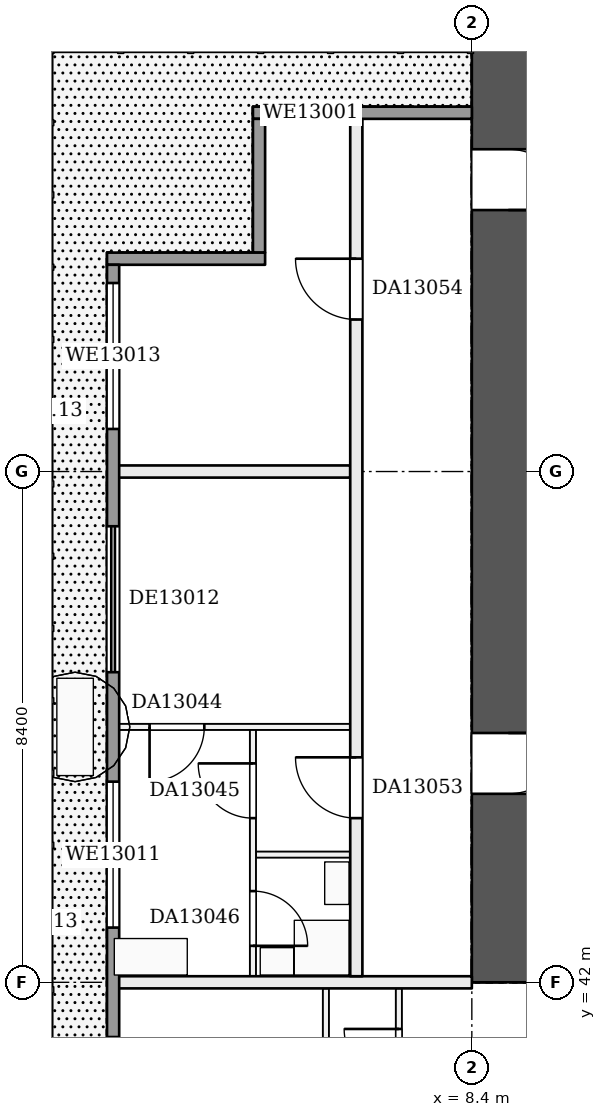
"""IFC4 building model, lengths in metres.
Left out: names, types, materials, properties, quantities, classifications, styles, units other than length and angle.
Written with IfcOpenShell. Run it as: python <this file> out.ifc"""

import sys

from ifc_helpers import new_model, si_unit, direction, frame, frame_2d, origin, place, context, subcontext, project, spatial, rectangle, extrude, element, fill, save


model = new_model("IFC4")
c1 = context("Model", 3, precision=1e-05, world=origin(), true_north=direction((0.0, 1.0)))
c2 = subcontext(c1, "Body", "Model", "MODEL_VIEW")
j1 = project(units=[si_unit("LENGTHUNIT", "METRE"), si_unit("PLANEANGLEUNIT", "RADIAN")], contexts=[c1])
p1 = place(None, origin())
s1 = spatial("IfcSite", under=j1, at=p1, CompositionType="ELEMENT")
p2 = place(p1, origin())
s2 = spatial("IfcBuilding", under=s1, at=p2, CompositionType="ELEMENT")
p3 = place(p2, frame((0.0, 0.0, 56.7)))
s3 = spatial("IfcBuildingStorey", under=s2, at=p3, CompositionType="ELEMENT", Elevation=56.7)
p4 = place(p3, frame((9.0, 58.8, 0.0), z_axis=(0.0, 0.0, 1.0), x_axis=(0.0, -1.0, 0.0)))
e1 = element("IfcWall", 1, at=p4, inside=s3, PredefinedType="SHEAR", context=c2, shape_type="SweptSolid", body=[
    extrude(rectangle(XDim=16.8, YDim=1.2, at=frame_2d((8.4, 0.0))), origin(), (0.0, 0.0, 1.0), 3.22),
])
p5 = place(p4, frame((3.1, 0.0, 0.0)))
e2 = element("IfcOpeningElement", 2, at=p5, cuts=e1, PredefinedType="OPENING", context=c2, shape_type="SweptSolid", body=[
    extrude(rectangle(XDim=1.0, YDim=2.1, at=frame_2d((0.5, 1.05))), frame((0.0, 0.61, 0.0), z_axis=(0.0, -1.0, 0.0), x_axis=(1.0, 0.0, 0.0)), (0.0, 0.0, 1.0), 1.22),
])
p6 = place(p4, frame((12.7, 0.0, 0.0)))
e3 = element("IfcOpeningElement", 3, at=p6, cuts=e1, PredefinedType="OPENING", context=c2, shape_type="SweptSolid", body=[
    extrude(rectangle(XDim=1.0, YDim=2.1, at=frame_2d((0.5, 1.05))), frame((0.0, 0.61, 0.0), z_axis=(0.0, -1.0, 0.0), x_axis=(1.0, 0.0, 0.0)), (0.0, 0.0, 1.0), 1.22),
])
p7 = place(p3, frame((2.5, 42.0, 0.0), z_axis=(0.0, 0.0, 1.0), x_axis=(1.0, 0.0, 0.0)))
e4 = element("IfcWall", 4, at=p7, inside=s3, PredefinedType="PARTITIONING", context=c2, shape_type="SweptSolid", body=[
    extrude(rectangle(XDim=5.9, YDim=0.2, at=frame_2d((2.95, 0.0))), origin(), (0.0, 0.0, 1.0), 3.22),
])
p8 = place(p3, frame((4.85, 44.1, 0.0), z_axis=(0.0, 0.0, 1.0), x_axis=(1.0, 0.0, 0.0)))
e5 = element("IfcWall", 5, at=p8, inside=s3, PredefinedType="PARTITIONING", context=c2, shape_type="SweptSolid", body=[
    extrude(rectangle(XDim=1.55, YDim=0.1, at=frame_2d((0.775, 0.0))), origin(), (0.0, 0.0, 1.0), 3.22),
])
p9 = place(p3, frame((2.5, 46.2, 0.0), z_axis=(0.0, 0.0, 1.0), x_axis=(1.0, 0.0, 0.0)))
e6 = element("IfcWall", 6, at=p9, inside=s3, PredefinedType="PARTITIONING", context=c2, shape_type="SweptSolid", body=[
    extrude(rectangle(XDim=3.9, YDim=0.1, at=frame_2d((1.95, 0.0))), origin(), (0.0, 0.0, 1.0), 3.22),
])
p10 = place(p9, frame((0.6, 0.0, 0.0)))
e7 = element("IfcOpeningElement", 7, at=p10, cuts=e6, PredefinedType="OPENING", context=c2, shape_type="SweptSolid", body=[
    extrude(rectangle(XDim=0.9, YDim=2.1, at=frame_2d((0.45, 1.05))), frame((0.0, 0.06, 0.0), z_axis=(0.0, -1.0, 0.0), x_axis=(1.0, 0.0, 0.0)), (0.0, 0.0, 1.0), 0.12),
])
p11 = place(p3, frame((2.5, 50.4, 0.0), z_axis=(0.0, 0.0, 1.0), x_axis=(1.0, 0.0, 0.0)))
e8 = element("IfcWall", 8, at=p11, inside=s3, PredefinedType="PARTITIONING", context=c2, shape_type="SweptSolid", body=[
    extrude(rectangle(XDim=3.9, YDim=0.2, at=frame_2d((1.95, 0.0))), origin(), (0.0, 0.0, 1.0), 3.22),
])
p12 = place(p3, frame((4.8, 42.1, 0.0), z_axis=(0.0, 0.0, 1.0), x_axis=(0.0, 1.0, 0.0)))
e9 = element("IfcWall", 9, at=p12, inside=s3, PredefinedType="PARTITIONING", context=c2, shape_type="SweptSolid", body=[
    extrude(rectangle(XDim=4.05, YDim=0.1, at=frame_2d((2.025, 0.0))), origin(), (0.0, 0.0, 1.0), 3.22),
])
p13 = place(p12, frame((2.6, 0.0, 0.0)))
e10 = element("IfcOpeningElement", 10, at=p13, cuts=e9, PredefinedType="OPENING", context=c2, shape_type="SweptSolid", body=[
    extrude(rectangle(XDim=0.9, YDim=2.1, at=frame_2d((0.45, 1.05))), frame((0.0, 0.06, 0.0), z_axis=(0.0, -1.0, 0.0), x_axis=(1.0, 0.0, 0.0)), (0.0, 0.0, 1.0), 0.12),
])
p14 = place(p12, frame((0.5, 0.0, 0.0)))
e11 = element("IfcOpeningElement", 11, at=p14, cuts=e9, PredefinedType="OPENING", context=c2, shape_type="SweptSolid", body=[
    extrude(rectangle(XDim=0.9, YDim=2.1, at=frame_2d((0.45, 1.05))), frame((0.0, 0.06, 0.0), z_axis=(0.0, -1.0, 0.0), x_axis=(1.0, 0.0, 0.0)), (0.0, 0.0, 1.0), 0.12),
])
p15 = place(p3, frame((6.0, 12.7, 0.0), z_axis=(0.0, 0.0, 1.0), x_axis=(0.0, 1.0, 0.0)))
e12 = element("IfcWall", 12, at=p15, inside=s3, PredefinedType="PARTITIONING", context=c2, shape_type="SweptSolid", body=[
    extrude(rectangle(XDim=29.2, YDim=0.1, at=frame_2d((14.6, 0.0))), origin(), (0.0, 0.0, 1.0), 3.22),
])
p16 = place(p15, frame((3.7, 0.0, 0.0)))
e13 = element("IfcOpeningElement", 13, at=p16, cuts=e12, PredefinedType="OPENING", context=c2, shape_type="SweptSolid", body=[
    extrude(rectangle(XDim=0.9, YDim=2.1, at=frame_2d((0.45, 1.05))), frame((0.0, 0.06, 0.0), z_axis=(0.0, -1.0, 0.0), x_axis=(1.0, 0.0, 0.0)), (0.0, 0.0, 1.0), 0.12),
])
p17 = place(p15, frame((10.0, 0.0, 0.0)))
e14 = element("IfcOpeningElement", 14, at=p17, cuts=e12, PredefinedType="OPENING", context=c2, shape_type="SweptSolid", body=[
    extrude(rectangle(XDim=0.9, YDim=2.1, at=frame_2d((0.45, 1.05))), frame((0.0, 0.06, 0.0), z_axis=(0.0, -1.0, 0.0), x_axis=(1.0, 0.0, 0.0)), (0.0, 0.0, 1.0), 0.12),
])
p18 = place(p15, frame((14.1, 0.0, 0.0)))
e15 = element("IfcOpeningElement", 15, at=p18, cuts=e12, PredefinedType="OPENING", context=c2, shape_type="SweptSolid", body=[
    extrude(rectangle(XDim=0.9, YDim=2.1, at=frame_2d((0.45, 1.05))), frame((0.0, 0.06, 0.0), z_axis=(0.0, -1.0, 0.0), x_axis=(1.0, 0.0, 0.0)), (0.0, 0.0, 1.0), 0.12),
])
p19 = place(p15, frame((18.3, 0.0, 0.0)))
e16 = element("IfcOpeningElement", 16, at=p19, cuts=e12, PredefinedType="OPENING", context=c2, shape_type="SweptSolid", body=[
    extrude(rectangle(XDim=0.9, YDim=2.1, at=frame_2d((0.45, 1.05))), frame((0.0, 0.06, 0.0), z_axis=(0.0, -1.0, 0.0), x_axis=(1.0, 0.0, 0.0)), (0.0, 0.0, 1.0), 0.12),
])
p20 = place(p15, frame((22.5, 0.0, 0.0)))
e17 = element("IfcOpeningElement", 17, at=p20, cuts=e12, PredefinedType="OPENING", context=c2, shape_type="SweptSolid", body=[
    extrude(rectangle(XDim=0.9, YDim=2.1, at=frame_2d((0.45, 1.05))), frame((0.0, 0.06, 0.0), z_axis=(0.0, -1.0, 0.0), x_axis=(1.0, 0.0, 0.0)), (0.0, 0.0, 1.0), 0.12),
])
p21 = place(p15, frame((26.7, 0.0, 0.0)))
e18 = element("IfcOpeningElement", 18, at=p21, cuts=e12, PredefinedType="OPENING", context=c2, shape_type="SweptSolid", body=[
    extrude(rectangle(XDim=0.9, YDim=2.1, at=frame_2d((0.45, 1.05))), frame((0.0, 0.06, 0.0), z_axis=(0.0, -1.0, 0.0), x_axis=(1.0, 0.0, 0.0)), (0.0, 0.0, 1.0), 0.12),
])
p22 = place(p3, frame((6.5, 42.1, 0.0), z_axis=(0.0, 0.0, 1.0), x_axis=(0.0, 1.0, 0.0)))
e19 = element("IfcWall", 19, at=p22, inside=s3, PredefinedType="PARTITIONING", context=c2, shape_type="SweptSolid", body=[
    extrude(rectangle(XDim=14.2, YDim=0.2, at=frame_2d((7.1, 0.0))), origin(), (0.0, 0.0, 1.0), 3.22),
])
p23 = place(p22, frame((2.6, 0.0, 0.0)))
e20 = element("IfcOpeningElement", 20, at=p23, cuts=e19, PredefinedType="OPENING", context=c2, shape_type="SweptSolid", body=[
    extrude(rectangle(XDim=1.0, YDim=2.1, at=frame_2d((0.5, 1.05))), frame((0.0, 0.11, 0.0), z_axis=(0.0, -1.0, 0.0), x_axis=(1.0, 0.0, 0.0)), (0.0, 0.0, 1.0), 0.22),
])
p24 = place(p22, frame((10.8, 0.0, 0.0)))
e21 = element("IfcOpeningElement", 21, at=p24, cuts=e19, PredefinedType="OPENING", context=c2, shape_type="SweptSolid", body=[
    extrude(rectangle(XDim=1.0, YDim=2.1, at=frame_2d((0.5, 1.05))), frame((0.0, 0.11, 0.0), z_axis=(0.0, -1.0, 0.0), x_axis=(1.0, 0.0, 0.0)), (0.0, 0.0, 1.0), 0.22),
])
p25 = place(p3, frame((7.2, 33.7, 0.0), z_axis=(0.0, 0.0, 1.0), x_axis=(0.0, 1.0, 0.0)))
e22 = element("IfcWall", 22, at=p25, inside=s3, PredefinedType="PARTITIONING", context=c2, shape_type="SweptSolid", body=[
    extrude(rectangle(XDim=8.2, YDim=0.1, at=frame_2d((4.1, 0.0))), origin(), (0.0, 0.0, 1.0), 3.22),
])
p26 = place(p25, frame((6.633, 0.0, 0.0)))
e23 = element("IfcOpeningElement", 23, at=p26, cuts=e22, PredefinedType="OPENING", context=c2, shape_type="SweptSolid", body=[
    extrude(rectangle(XDim=0.9, YDim=2.1, at=frame_2d((0.45, 1.05))), frame((0.0, 0.06, 0.0), z_axis=(0.0, -1.0, 0.0), x_axis=(1.0, 0.0, 0.0)), (0.0, 0.0, 1.0), 0.12),
])
p27 = place(p25, frame((1.1, 0.0, 0.0)))
e24 = element("IfcOpeningElement", 24, at=p27, cuts=e22, PredefinedType="OPENING", context=c2, shape_type="SweptSolid", body=[
    extrude(rectangle(XDim=0.9, YDim=2.1, at=frame_2d((0.45, 1.05))), frame((0.0, 0.06, 0.0), z_axis=(0.0, -1.0, 0.0), x_axis=(1.0, 0.0, 0.0)), (0.0, 0.0, 1.0), 0.12),
])
p28 = place(p25, frame((4.067, 0.0, 0.0)))
e25 = element("IfcOpeningElement", 25, at=p28, cuts=e22, PredefinedType="OPENING", context=c2, shape_type="SweptSolid", body=[
    extrude(rectangle(XDim=0.9, YDim=2.1, at=frame_2d((0.45, 1.05))), frame((0.0, 0.06, 0.0), z_axis=(0.0, -1.0, 0.0), x_axis=(1.0, 0.0, 0.0)), (0.0, 0.0, 1.0), 0.12),
])
p29 = place(p3, frame((8.4, 56.3, 0.0), z_axis=(0.0, 0.0, 1.0), x_axis=(-1.0, 0.0, 0.0)))
e26 = element("IfcWall", 26, at=p29, inside=s3, PredefinedType="SOLIDWALL", context=c2, shape_type="SweptSolid", body=[
    extrude(rectangle(XDim=3.6, YDim=0.2, at=frame_2d((1.8, 0.0))), origin(), (0.0, 0.0, 1.0), 3.22),
])
p30 = place(p29, frame((2.0, 0.0, 0.9)))
e27 = element("IfcOpeningElement", 27, at=p30, cuts=e26, PredefinedType="OPENING", context=c2, shape_type="SweptSolid", body=[
    extrude(rectangle(XDim=1.3, YDim=1.5, at=frame_2d((0.65, 0.75))), frame((0.0, 0.11, 0.0), z_axis=(0.0, -1.0, 0.0), x_axis=(1.0, 0.0, 0.0)), (0.0, 0.0, 1.0), 0.22),
])
p31 = place(p3, frame((4.9, 56.2, 0.0), z_axis=(0.0, 0.0, 1.0), x_axis=(0.0, -1.0, 0.0)))
e28 = element("IfcWall", 28, at=p31, inside=s3, PredefinedType="SOLIDWALL", context=c2, shape_type="SweptSolid", body=[
    extrude(rectangle(XDim=2.2, YDim=0.2, at=frame_2d((1.1, 0.0))), origin(), (0.0, 0.0, 1.0), 3.22),
])
p32 = place(p3, frame((5.0, 53.9, 0.0), z_axis=(0.0, 0.0, 1.0), x_axis=(-1.0, 0.0, 0.0)))
e29 = element("IfcWall", 29, at=p32, inside=s3, PredefinedType="SOLIDWALL", context=c2, shape_type="SweptSolid", body=[
    extrude(rectangle(XDim=2.6, YDim=0.2, at=frame_2d((1.3, 0.0))), origin(), (0.0, 0.0, 1.0), 3.22),
])
p33 = place(p3, frame((2.5, 53.8, 0.0), z_axis=(0.0, 0.0, 1.0), x_axis=(0.0, -1.0, 0.0)))
e30 = element("IfcWall", 30, at=p33, inside=s3, PredefinedType="SOLIDWALL", context=c2, shape_type="SweptSolid", body=[
    extrude(rectangle(XDim=48.8, YDim=0.2, at=frame_2d((24.4, 0.0))), origin(), (0.0, 0.0, 1.0), 3.22),
])
p34 = place(p33, frame((46.1, 0.0, 0.0)))
e31 = element("IfcOpeningElement", 31, at=p34, cuts=e30, PredefinedType="OPENING", context=c2, shape_type="SweptSolid", body=[
    extrude(rectangle(XDim=2.4, YDim=2.2, at=frame_2d((1.2, 1.1))), frame((0.0, 0.11, 0.0), z_axis=(0.0, -1.0, 0.0), x_axis=(1.0, 0.0, 0.0)), (0.0, 0.0, 1.0), 0.22),
])
p35 = place(p33, frame((42.1, 0.0, 0.0)))
e32 = element("IfcOpeningElement", 32, at=p35, cuts=e30, PredefinedType="OPENING", context=c2, shape_type="SweptSolid", body=[
    extrude(rectangle(XDim=2.4, YDim=2.2, at=frame_2d((1.2, 1.1))), frame((0.0, 0.11, 0.0), z_axis=(0.0, -1.0, 0.0), x_axis=(1.0, 0.0, 0.0)), (0.0, 0.0, 1.0), 0.22),
])
p36 = place(p33, frame((37.9, 0.0, 0.0)))
e33 = element("IfcOpeningElement", 33, at=p36, cuts=e30, PredefinedType="OPENING", context=c2, shape_type="SweptSolid", body=[
    extrude(rectangle(XDim=2.4, YDim=2.2, at=frame_2d((1.2, 1.1))), frame((0.0, 0.11, 0.0), z_axis=(0.0, -1.0, 0.0), x_axis=(1.0, 0.0, 0.0)), (0.0, 0.0, 1.0), 0.22),
])
p37 = place(p33, frame((33.7, 0.0, 0.0)))
e34 = element("IfcOpeningElement", 34, at=p37, cuts=e30, PredefinedType="OPENING", context=c2, shape_type="SweptSolid", body=[
    extrude(rectangle(XDim=2.4, YDim=2.2, at=frame_2d((1.2, 1.1))), frame((0.0, 0.11, 0.0), z_axis=(0.0, -1.0, 0.0), x_axis=(1.0, 0.0, 0.0)), (0.0, 0.0, 1.0), 0.22),
])
p38 = place(p33, frame((29.5, 0.0, 0.9)))
e35 = element("IfcOpeningElement", 35, at=p38, cuts=e30, PredefinedType="OPENING", context=c2, shape_type="SweptSolid", body=[
    extrude(rectangle(XDim=2.4, YDim=1.5, at=frame_2d((1.2, 0.75))), frame((0.0, 0.11, 0.0), z_axis=(0.0, -1.0, 0.0), x_axis=(1.0, 0.0, 0.0)), (0.0, 0.0, 1.0), 0.22),
])
p39 = place(p33, frame((25.3, 0.0, 0.0)))
e36 = element("IfcOpeningElement", 36, at=p39, cuts=e30, PredefinedType="OPENING", context=c2, shape_type="SweptSolid", body=[
    extrude(rectangle(XDim=2.4, YDim=2.2, at=frame_2d((1.2, 1.1))), frame((0.0, 0.11, 0.0), z_axis=(0.0, -1.0, 0.0), x_axis=(1.0, 0.0, 0.0)), (0.0, 0.0, 1.0), 0.22),
])
p40 = place(p33, frame((21.1, 0.0, 0.9)))
e37 = element("IfcOpeningElement", 37, at=p40, cuts=e30, PredefinedType="OPENING", context=c2, shape_type="SweptSolid", body=[
    extrude(rectangle(XDim=2.4, YDim=1.5, at=frame_2d((1.2, 0.75))), frame((0.0, 0.11, 0.0), z_axis=(0.0, -1.0, 0.0), x_axis=(1.0, 0.0, 0.0)), (0.0, 0.0, 1.0), 0.22),
])
p41 = place(p33, frame((16.9, 0.0, 0.0)))
e38 = element("IfcOpeningElement", 38, at=p41, cuts=e30, PredefinedType="OPENING", context=c2, shape_type="SweptSolid", body=[
    extrude(rectangle(XDim=2.4, YDim=2.2, at=frame_2d((1.2, 1.1))), frame((0.0, 0.11, 0.0), z_axis=(0.0, -1.0, 0.0), x_axis=(1.0, 0.0, 0.0)), (0.0, 0.0, 1.0), 0.22),
])
p42 = place(p33, frame((12.7, 0.0, 0.9)))
e39 = element("IfcOpeningElement", 39, at=p42, cuts=e30, PredefinedType="OPENING", context=c2, shape_type="SweptSolid", body=[
    extrude(rectangle(XDim=2.4, YDim=1.5, at=frame_2d((1.2, 0.75))), frame((0.0, 0.11, 0.0), z_axis=(0.0, -1.0, 0.0), x_axis=(1.0, 0.0, 0.0)), (0.0, 0.0, 1.0), 0.22),
])
p43 = place(p33, frame((8.5, 0.0, 0.9)))
e40 = element("IfcOpeningElement", 40, at=p43, cuts=e30, PredefinedType="OPENING", context=c2, shape_type="SweptSolid", body=[
    extrude(rectangle(XDim=2.4, YDim=1.5, at=frame_2d((1.2, 0.75))), frame((0.0, 0.11, 0.0), z_axis=(0.0, -1.0, 0.0), x_axis=(1.0, 0.0, 0.0)), (0.0, 0.0, 1.0), 0.22),
])
p44 = place(p33, frame((4.3, 0.0, 0.0)))
e41 = element("IfcOpeningElement", 41, at=p44, cuts=e30, PredefinedType="OPENING", context=c2, shape_type="SweptSolid", body=[
    extrude(rectangle(XDim=2.4, YDim=2.2, at=frame_2d((1.2, 1.1))), frame((0.0, 0.11, 0.0), z_axis=(0.0, -1.0, 0.0), x_axis=(1.0, 0.0, 0.0)), (0.0, 0.0, 1.0), 0.22),
])
p45 = place(p33, frame((0.3, 0.0, 0.9)))
e42 = element("IfcOpeningElement", 42, at=p45, cuts=e30, PredefinedType="OPENING", context=c2, shape_type="SweptSolid", body=[
    extrude(rectangle(XDim=2.4, YDim=1.5, at=frame_2d((1.2, 0.75))), frame((0.0, 0.11, 0.0), z_axis=(0.0, -1.0, 0.0), x_axis=(1.0, 0.0, 0.0)), (0.0, 0.0, 1.0), 0.22),
])
p46 = place(p5, origin())
e43 = element("IfcDoor", 43, at=p46, inside=s3, OperationType="SINGLE_SWING_RIGHT", PredefinedType="DOOR", context=c2, shape_type="SweptSolid", body=[
    extrude(rectangle(XDim=1.0, YDim=2.1, at=frame_2d((0.5, 1.05))), frame((0.0, 0.025, 0.0), z_axis=(0.0, -1.0, 0.0), x_axis=(1.0, 0.0, 0.0)), (0.0, 0.0, 1.0), 0.05),
])
fill(e2, e43)
p47 = place(p6, origin())
e44 = element("IfcDoor", 44, at=p47, inside=s3, OperationType="SINGLE_SWING_LEFT", PredefinedType="DOOR", context=c2, shape_type="SweptSolid", body=[
    extrude(rectangle(XDim=1.0, YDim=2.1, at=frame_2d((0.5, 1.05))), frame((0.0, 0.025, 0.0), z_axis=(0.0, -1.0, 0.0), x_axis=(1.0, 0.0, 0.0)), (0.0, 0.0, 1.0), 0.05),
])
fill(e3, e44)
p48 = place(p10, frame((0.9, 0.0, 0.0), z_axis=(0.0, 0.0, 1.0), x_axis=(-1.0, 0.0, 0.0)))
e45 = element("IfcDoor", 45, at=p48, inside=s3, OperationType="SINGLE_SWING_RIGHT", PredefinedType="DOOR", context=c2, shape_type="SweptSolid", body=[
    extrude(rectangle(XDim=0.9, YDim=2.1, at=frame_2d((0.45, 1.05))), frame((0.0, 0.025, 0.0), z_axis=(0.0, -1.0, 0.0), x_axis=(1.0, 0.0, 0.0)), (0.0, 0.0, 1.0), 0.05),
])
fill(e7, e45)
p49 = place(p13, origin())
e46 = element("IfcDoor", 46, at=p49, inside=s3, OperationType="SINGLE_SWING_RIGHT", PredefinedType="DOOR", context=c2, shape_type="SweptSolid", body=[
    extrude(rectangle(XDim=0.9, YDim=2.1, at=frame_2d((0.45, 1.05))), frame((0.0, 0.025, 0.0), z_axis=(0.0, -1.0, 0.0), x_axis=(1.0, 0.0, 0.0)), (0.0, 0.0, 1.0), 0.05),
])
fill(e10, e46)
p50 = place(p14, frame((0.9, 0.0, 0.0), z_axis=(0.0, 0.0, 1.0), x_axis=(-1.0, 0.0, 0.0)))
e47 = element("IfcDoor", 47, at=p50, inside=s3, OperationType="SINGLE_SWING_RIGHT", PredefinedType="DOOR", context=c2, shape_type="SweptSolid", body=[
    extrude(rectangle(XDim=0.9, YDim=2.1, at=frame_2d((0.45, 1.05))), frame((0.0, 0.025, 0.0), z_axis=(0.0, -1.0, 0.0), x_axis=(1.0, 0.0, 0.0)), (0.0, 0.0, 1.0), 0.05),
])
fill(e11, e47)
p51 = place(p23, origin())
e48 = element("IfcDoor", 48, at=p51, inside=s3, OperationType="SINGLE_SWING_RIGHT", PredefinedType="DOOR", context=c2, shape_type="SweptSolid", body=[
    extrude(rectangle(XDim=1.0, YDim=2.1, at=frame_2d((0.5, 1.05))), frame((0.0, 0.025, 0.0), z_axis=(0.0, -1.0, 0.0), x_axis=(1.0, 0.0, 0.0)), (0.0, 0.0, 1.0), 0.05),
])
fill(e20, e48)
p52 = place(p24, origin())
e49 = element("IfcDoor", 49, at=p52, inside=s3, OperationType="SINGLE_SWING_RIGHT", PredefinedType="DOOR", context=c2, shape_type="SweptSolid", body=[
    extrude(rectangle(XDim=1.0, YDim=2.1, at=frame_2d((0.5, 1.05))), frame((0.0, 0.025, 0.0), z_axis=(0.0, -1.0, 0.0), x_axis=(1.0, 0.0, 0.0)), (0.0, 0.0, 1.0), 0.05),
])
fill(e21, e49)
p53 = place(p26, origin())
e50 = element("IfcDoor", 50, at=p53, inside=s3, OperationType="SINGLE_SWING_RIGHT", PredefinedType="DOOR", context=c2, shape_type="SweptSolid", body=[
    extrude(rectangle(XDim=0.9, YDim=2.1, at=frame_2d((0.45, 1.05))), frame((0.0, 0.025, 0.0), z_axis=(0.0, -1.0, 0.0), x_axis=(1.0, 0.0, 0.0)), (0.0, 0.0, 1.0), 0.05),
])
fill(e23, e50)
p54 = place(p30, origin())
e51 = element("IfcWindow", 51, at=p54, inside=s3, PartitioningType="SINGLE_PANEL", PredefinedType="WINDOW", context=c2, shape_type="SweptSolid", body=[
    extrude(rectangle(XDim=1.3, YDim=1.5, at=frame_2d((0.65, 0.75))), frame((0.0, 0.03, 0.0), z_axis=(0.0, -1.0, 0.0), x_axis=(1.0, 0.0, 0.0)), (0.0, 0.0, 1.0), 0.06),
])
fill(e27, e51)
p55 = place(p43, origin())
e52 = element("IfcWindow", 52, at=p55, inside=s3, PartitioningType="SINGLE_PANEL", PredefinedType="WINDOW", context=c2, shape_type="SweptSolid", body=[
    extrude(rectangle(XDim=2.4, YDim=1.5, at=frame_2d((1.2, 0.75))), frame((0.0, 0.03, 0.0), z_axis=(0.0, -1.0, 0.0), x_axis=(1.0, 0.0, 0.0)), (0.0, 0.0, 1.0), 0.06),
])
fill(e40, e52)
p56 = place(p44, origin())
e53 = element("IfcDoor", 53, at=p56, inside=s3, OperationType="DOUBLE_DOOR_SLIDING", PredefinedType="DOOR", context=c2, shape_type="SweptSolid", body=[
    extrude(rectangle(XDim=2.4, YDim=2.2, at=frame_2d((1.2, 1.1))), frame((0.0, 0.025, 0.0), z_axis=(0.0, -1.0, 0.0), x_axis=(1.0, 0.0, 0.0)), (0.0, 0.0, 1.0), 0.05),
])
fill(e41, e53)
p57 = place(p45, origin())
e54 = element("IfcWindow", 54, at=p57, inside=s3, PartitioningType="SINGLE_PANEL", PredefinedType="WINDOW", context=c2, shape_type="SweptSolid", body=[
    extrude(rectangle(XDim=2.4, YDim=1.5, at=frame_2d((1.2, 0.75))), frame((0.0, 0.03, 0.0), z_axis=(0.0, -1.0, 0.0), x_axis=(1.0, 0.0, 0.0)), (0.0, 0.0, 1.0), 0.06),
])
fill(e42, e54)
save(model, sys.argv[1])
